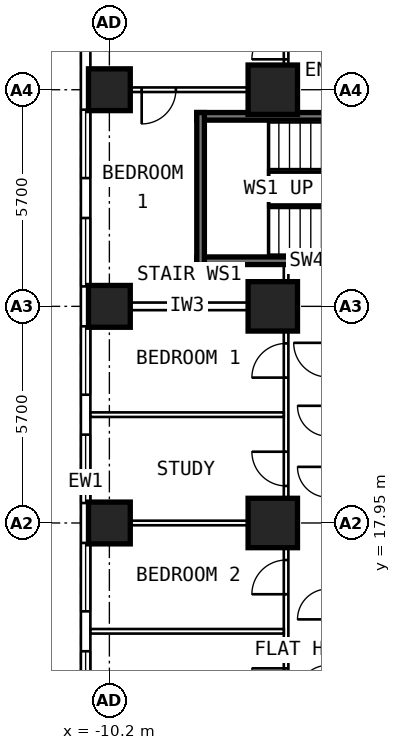
"""IFC4 building model, lengths in metres.
Left out: names, types, materials, properties, quantities, classifications, styles, units other than length and angle.
Written with IfcOpenShell. Run it as: python <this file> out.ifc"""

import sys

from ifc_helpers import new_model, si_unit, direction, frame, frame_2d, origin, origin_2d, place, context, subcontext, project, spatial, rectangle, extrude, element, fill, save


model = new_model("IFC4")
c1 = context("Model", 3, precision=1e-05, world=origin(), true_north=direction((0.0, 1.0)))
c2 = subcontext(c1, "Body", "Model", "MODEL_VIEW")
j1 = project(units=[si_unit("LENGTHUNIT", "METRE"), si_unit("PLANEANGLEUNIT", "RADIAN")], contexts=[c1])
p1 = place(None, origin())
s1 = spatial("IfcSite", under=j1, at=p1, CompositionType="ELEMENT")
p2 = place(p1, origin())
s2 = spatial("IfcBuilding", under=s1, at=p2, CompositionType="ELEMENT")
p3 = place(p2, frame((0.0, 0.0, 43.0)))
s3 = spatial("IfcBuildingStorey", under=s2, at=p3, CompositionType="ELEMENT", Elevation=43.0)
for number, where, z_axis, x_axis in (
    (1, (-10.2, 17.95, 0.0), (0.0, 0.0, 1.0), (0.0, 1.0, 0.0)),
    (2, (-10.2, 23.65, 0.0), (0.0, 0.0, 1.0), (0.0, 1.0, 0.0)),
    (3, (-10.2, 29.35, 0.0), (0.0, 0.0, 1.0), (0.0, 1.0, 0.0)),
):
    element("IfcColumn", number, at=place(p3, frame(where, z_axis=z_axis, x_axis=x_axis)), inside=s3, PredefinedType="COLUMN", context=c2, shape_type="SweptSolid", body=[
        extrude(rectangle(XDim=1.1, YDim=1.1, at=origin_2d()), origin(), (0.0, 0.0, 1.0), 3.6),
    ])
for number, where, z_axis, x_axis in (
    (4, (-5.9, 17.95, 0.0), (0.0, 0.0, 1.0), (0.0, 1.0, 0.0)),
    (5, (-5.9, 23.65, 0.0), (0.0, 0.0, 1.0), (0.0, 1.0, 0.0)),
    (6, (-5.9, 29.35, 0.0), (0.0, 0.0, 1.0), (0.0, 1.0, 0.0)),
):
    element("IfcColumn", number, at=place(p3, frame(where, z_axis=z_axis, x_axis=x_axis)), inside=s3, PredefinedType="COLUMN", context=c2, shape_type="SweptSolid", body=[
        extrude(rectangle(XDim=1.3, YDim=1.3, at=origin_2d()), origin(), (0.0, 0.0, 1.0), 3.6),
    ])
p4 = place(p3, frame((-10.825, 6.409, 0.0), z_axis=(0.0, 0.0, 1.0), x_axis=(0.0, 1.0, 0.0)))
e7 = element("IfcWall", 7, at=p4, inside=s3, PredefinedType="SOLIDWALL", context=c2, shape_type="SweptSolid", body=[
    extrude(rectangle(XDim=25.226, YDim=0.25, at=frame_2d((12.613, 0.0))), origin(), (0.0, 0.0, 1.0), 3.35),
])
p5 = place(p4, frame((0.666, 0.0, 0.8)))
e8 = element("IfcOpeningElement", 8, at=p5, cuts=e7, PredefinedType="OPENING", context=c2, shape_type="SweptSolid", body=[
    extrude(rectangle(XDim=1.8, YDim=1.8, at=frame_2d((0.9, 0.9))), frame((0.0, 0.137, 0.0), z_axis=(0.0, -1.0, 0.0), x_axis=(1.0, 0.0, 0.0)), (0.0, 0.0, 1.0), 0.274),
])
p6 = place(p4, frame((3.516, 0.0, 0.8)))
e9 = element("IfcOpeningElement", 9, at=p6, cuts=e7, PredefinedType="OPENING", context=c2, shape_type="SweptSolid", body=[
    extrude(rectangle(XDim=1.8, YDim=1.8, at=frame_2d((0.9, 0.9))), frame((0.0, 0.137, 0.0), z_axis=(0.0, -1.0, 0.0), x_axis=(1.0, 0.0, 0.0)), (0.0, 0.0, 1.0), 0.274),
])
p7 = place(p4, frame((6.366, 0.0, 0.8)))
e10 = element("IfcOpeningElement", 10, at=p7, cuts=e7, PredefinedType="OPENING", context=c2, shape_type="SweptSolid", body=[
    extrude(rectangle(XDim=1.8, YDim=1.8, at=frame_2d((0.9, 0.9))), frame((0.0, 0.137, 0.0), z_axis=(0.0, -1.0, 0.0), x_axis=(1.0, 0.0, 0.0)), (0.0, 0.0, 1.0), 0.274),
])
p8 = place(p4, frame((9.216, 0.0, 0.8)))
e11 = element("IfcOpeningElement", 11, at=p8, cuts=e7, PredefinedType="OPENING", context=c2, shape_type="SweptSolid", body=[
    extrude(rectangle(XDim=1.8, YDim=1.8, at=frame_2d((0.9, 0.9))), frame((0.0, 0.137, 0.0), z_axis=(0.0, -1.0, 0.0), x_axis=(1.0, 0.0, 0.0)), (0.0, 0.0, 1.0), 0.274),
])
p9 = place(p4, frame((12.066, 0.0, 0.8)))
e12 = element("IfcOpeningElement", 12, at=p9, cuts=e7, PredefinedType="OPENING", context=c2, shape_type="SweptSolid", body=[
    extrude(rectangle(XDim=1.8, YDim=1.8, at=frame_2d((0.9, 0.9))), frame((0.0, 0.137, 0.0), z_axis=(0.0, -1.0, 0.0), x_axis=(1.0, 0.0, 0.0)), (0.0, 0.0, 1.0), 0.274),
])
p10 = place(p4, frame((14.916, 0.0, 0.8)))
e13 = element("IfcOpeningElement", 13, at=p10, cuts=e7, PredefinedType="OPENING", context=c2, shape_type="SweptSolid", body=[
    extrude(rectangle(XDim=1.8, YDim=1.8, at=frame_2d((0.9, 0.9))), frame((0.0, 0.137, 0.0), z_axis=(0.0, -1.0, 0.0), x_axis=(1.0, 0.0, 0.0)), (0.0, 0.0, 1.0), 0.274),
])
p11 = place(p4, frame((17.766, 0.0, 0.8)))
e14 = element("IfcOpeningElement", 14, at=p11, cuts=e7, PredefinedType="OPENING", context=c2, shape_type="SweptSolid", body=[
    extrude(rectangle(XDim=1.8, YDim=1.8, at=frame_2d((0.9, 0.9))), frame((0.0, 0.137, 0.0), z_axis=(0.0, -1.0, 0.0), x_axis=(1.0, 0.0, 0.0)), (0.0, 0.0, 1.0), 0.274),
])
p12 = place(p4, frame((20.616, 0.0, 0.8)))
e15 = element("IfcOpeningElement", 15, at=p12, cuts=e7, PredefinedType="OPENING", context=c2, shape_type="SweptSolid", body=[
    extrude(rectangle(XDim=1.8, YDim=1.8, at=frame_2d((0.9, 0.9))), frame((0.0, 0.137, 0.0), z_axis=(0.0, -1.0, 0.0), x_axis=(1.0, 0.0, 0.0)), (0.0, 0.0, 1.0), 0.274),
])
p13 = place(p3, frame((-5.55, 9.691, 0.0), z_axis=(0.0, 0.0, 1.0), x_axis=(0.0, 1.0, 0.0)))
e16 = element("IfcWall", 16, at=p13, inside=s3, PredefinedType="PARTITIONING", context=c2, shape_type="SweptSolid", body=[
    extrude(rectangle(XDim=15.059, YDim=0.12, at=frame_2d((7.53, 0.0))), origin(), (0.0, 0.0, 1.0), 3.35),
])
p14 = place(p13, frame((0.859, 0.0, 0.0)))
e17 = element("IfcOpeningElement", 17, at=p14, cuts=e16, PredefinedType="OPENING", context=c2, shape_type="SweptSolid", body=[
    extrude(rectangle(XDim=0.9, YDim=2.1, at=frame_2d((0.45, 1.05))), frame((0.0, 0.072, 0.0), z_axis=(0.0, -1.0, 0.0), x_axis=(1.0, 0.0, 0.0)), (0.0, 0.0, 1.0), 0.144),
])
p15 = place(p13, frame((3.534, 0.0, 0.0)))
e18 = element("IfcOpeningElement", 18, at=p15, cuts=e16, PredefinedType="OPENING", context=c2, shape_type="SweptSolid", body=[
    extrude(rectangle(XDim=0.9, YDim=2.1, at=frame_2d((0.45, 1.05))), frame((0.0, 0.072, 0.0), z_axis=(0.0, -1.0, 0.0), x_axis=(1.0, 0.0, 0.0)), (0.0, 0.0, 1.0), 0.144),
])
p16 = place(p13, frame((6.384, 0.0, 0.0)))
e19 = element("IfcOpeningElement", 19, at=p16, cuts=e16, PredefinedType="OPENING", context=c2, shape_type="SweptSolid", body=[
    extrude(rectangle(XDim=0.9, YDim=2.1, at=frame_2d((0.45, 1.05))), frame((0.0, 0.072, 0.0), z_axis=(0.0, -1.0, 0.0), x_axis=(1.0, 0.0, 0.0)), (0.0, 0.0, 1.0), 0.144),
])
p17 = place(p13, frame((9.234, 0.0, 0.0)))
e20 = element("IfcOpeningElement", 20, at=p17, cuts=e16, PredefinedType="OPENING", context=c2, shape_type="SweptSolid", body=[
    extrude(rectangle(XDim=0.9, YDim=2.1, at=frame_2d((0.45, 1.05))), frame((0.0, 0.072, 0.0), z_axis=(0.0, -1.0, 0.0), x_axis=(1.0, 0.0, 0.0)), (0.0, 0.0, 1.0), 0.144),
])
p18 = place(p13, frame((12.084, 0.0, 0.0)))
e21 = element("IfcOpeningElement", 21, at=p18, cuts=e16, PredefinedType="OPENING", context=c2, shape_type="SweptSolid", body=[
    extrude(rectangle(XDim=0.9, YDim=2.1, at=frame_2d((0.45, 1.05))), frame((0.0, 0.072, 0.0), z_axis=(0.0, -1.0, 0.0), x_axis=(1.0, 0.0, 0.0)), (0.0, 0.0, 1.0), 0.144),
])
p19 = place(p3, frame((-5.61, 15.1, 0.0), z_axis=(0.0, 0.0, 1.0), x_axis=(-1.0, 0.0, 0.0)))
e22 = element("IfcWall", 22, at=p19, inside=s3, PredefinedType="PARTITIONING", context=c2, shape_type="SweptSolid", body=[
    extrude(rectangle(XDim=5.09, YDim=0.12, at=frame_2d((2.545, 0.0))), origin(), (0.0, 0.0, 1.0), 3.35),
])
p20 = place(p3, frame((-5.61, 17.95, 0.0), z_axis=(0.0, 0.0, 1.0), x_axis=(-1.0, 0.0, 0.0)))
e23 = element("IfcWall", 23, at=p20, inside=s3, PredefinedType="PARTITIONING", context=c2, shape_type="SweptSolid", body=[
    extrude(rectangle(XDim=5.09, YDim=0.12, at=frame_2d((2.545, 0.0))), origin(), (0.0, 0.0, 1.0), 2.45),
])
p21 = place(p3, frame((-5.61, 20.8, 0.0), z_axis=(0.0, 0.0, 1.0), x_axis=(-1.0, 0.0, 0.0)))
e24 = element("IfcWall", 24, at=p21, inside=s3, PredefinedType="PARTITIONING", context=c2, shape_type="SweptSolid", body=[
    extrude(rectangle(XDim=5.09, YDim=0.12, at=frame_2d((2.545, 0.0))), origin(), (0.0, 0.0, 1.0), 3.35),
])
p22 = place(p3, frame((-5.61, 23.65, 0.0), z_axis=(0.0, 0.0, 1.0), x_axis=(-1.0, 0.0, 0.0)))
e25 = element("IfcWall", 25, at=p22, inside=s3, PredefinedType="PARTITIONING", context=c2, shape_type="SweptSolid", body=[
    extrude(rectangle(XDim=5.09, YDim=0.2, at=frame_2d((2.545, 0.0))), origin(), (0.0, 0.0, 1.0), 2.45),
])
p23 = place(p3, frame((-5.61, 29.35, 0.0), z_axis=(0.0, 0.0, 1.0), x_axis=(-1.0, 0.0, 0.0)))
e26 = element("IfcWall", 26, at=p23, inside=s3, PredefinedType="PARTITIONING", context=c2, shape_type="SweptSolid", body=[
    extrude(rectangle(XDim=5.09, YDim=0.12, at=frame_2d((2.545, 0.0))), origin(), (0.0, 0.0, 1.0), 2.45),
])
p24 = place(p23, frame((2.84, 0.0, 0.0)))
e27 = element("IfcOpeningElement", 27, at=p24, cuts=e26, PredefinedType="OPENING", context=c2, shape_type="SweptSolid", body=[
    extrude(rectangle(XDim=0.9, YDim=2.1, at=frame_2d((0.45, 1.05))), frame((0.0, 0.072, 0.0), z_axis=(0.0, -1.0, 0.0), x_axis=(1.0, 0.0, 0.0)), (0.0, 0.0, 1.0), 0.144),
])
p25 = place(p3, frame((-5.55, 28.95, 0.0), z_axis=(0.0, 0.0, 1.0), x_axis=(0.0, 1.0, 0.0)))
e28 = element("IfcWall", 28, at=p25, inside=s3, PredefinedType="PARTITIONING", context=c2, shape_type="SweptSolid", body=[
    extrude(rectangle(XDim=5.445, YDim=0.12, at=frame_2d((2.723, 0.0))), origin(), (0.0, 0.0, 1.0), 3.35),
])
p26 = place(p25, frame((1.2, 0.0, 0.0)))
e29 = element("IfcOpeningElement", 29, at=p26, cuts=e28, PredefinedType="OPENING", context=c2, shape_type="SweptSolid", body=[
    extrude(rectangle(XDim=0.9, YDim=2.1, at=frame_2d((0.45, 1.05))), frame((0.0, 0.072, 0.0), z_axis=(0.0, -1.0, 0.0), x_axis=(1.0, 0.0, 0.0)), (0.0, 0.0, 1.0), 0.144),
])
for number, where, z_axis, x_axis in (
    (30, (-2.1, 24.85, 0.0), (0.0, 0.0, 1.0), (-1.0, 0.0, 0.0)),
    (31, (-2.1, 28.65, 0.0), (0.0, 0.0, 1.0), (-1.0, 0.0, 0.0)),
):
    element("IfcWall", number, at=place(p3, frame(where, z_axis=z_axis, x_axis=x_axis)), inside=s3, PredefinedType="SHEAR", context=c2, shape_type="SweptSolid", body=[
        extrude(rectangle(XDim=5.8, YDim=0.2, at=frame_2d((2.9, 0.0))), origin(), (0.0, 0.0, 1.0), 3.33),
    ])
p27 = place(p3, frame((-7.8, 24.75, 0.0), z_axis=(0.0, 0.0, 1.0), x_axis=(0.0, 1.0, 0.0)))
e32 = element("IfcWall", 32, at=p27, inside=s3, PredefinedType="SHEAR", context=c2, shape_type="SweptSolid", body=[
    extrude(rectangle(XDim=4.0, YDim=0.2, at=frame_2d((2.0, 0.0))), origin(), (0.0, 0.0, 1.0), 3.33),
])
p28 = place(p7, origin())
e33 = element("IfcWindow", 33, at=p28, inside=s3, PartitioningType="SINGLE_PANEL", PredefinedType="WINDOW", context=c2, shape_type="SweptSolid", body=[
    extrude(rectangle(XDim=1.8, YDim=1.8, at=frame_2d((0.9, 0.9))), frame((0.0, 0.03, 0.0), z_axis=(0.0, -1.0, 0.0), x_axis=(1.0, 0.0, 0.0)), (0.0, 0.0, 1.0), 0.06),
])
fill(e10, e33)
p29 = place(p8, origin())
e34 = element("IfcWindow", 34, at=p29, inside=s3, PartitioningType="SINGLE_PANEL", PredefinedType="WINDOW", context=c2, shape_type="SweptSolid", body=[
    extrude(rectangle(XDim=1.8, YDim=1.8, at=frame_2d((0.9, 0.9))), frame((0.0, 0.03, 0.0), z_axis=(0.0, -1.0, 0.0), x_axis=(1.0, 0.0, 0.0)), (0.0, 0.0, 1.0), 0.06),
])
fill(e11, e34)
p30 = place(p9, origin())
e35 = element("IfcWindow", 35, at=p30, inside=s3, PartitioningType="SINGLE_PANEL", PredefinedType="WINDOW", context=c2, shape_type="SweptSolid", body=[
    extrude(rectangle(XDim=1.8, YDim=1.8, at=frame_2d((0.9, 0.9))), frame((0.0, 0.03, 0.0), z_axis=(0.0, -1.0, 0.0), x_axis=(1.0, 0.0, 0.0)), (0.0, 0.0, 1.0), 0.06),
])
fill(e12, e35)
p31 = place(p10, origin())
e36 = element("IfcWindow", 36, at=p31, inside=s3, PartitioningType="SINGLE_PANEL", PredefinedType="WINDOW", context=c2, shape_type="SweptSolid", body=[
    extrude(rectangle(XDim=1.8, YDim=1.8, at=frame_2d((0.9, 0.9))), frame((0.0, 0.03, 0.0), z_axis=(0.0, -1.0, 0.0), x_axis=(1.0, 0.0, 0.0)), (0.0, 0.0, 1.0), 0.06),
])
fill(e13, e36)
p32 = place(p11, origin())
e37 = element("IfcWindow", 37, at=p32, inside=s3, PartitioningType="SINGLE_PANEL", PredefinedType="WINDOW", context=c2, shape_type="SweptSolid", body=[
    extrude(rectangle(XDim=1.8, YDim=1.8, at=frame_2d((0.9, 0.9))), frame((0.0, 0.03, 0.0), z_axis=(0.0, -1.0, 0.0), x_axis=(1.0, 0.0, 0.0)), (0.0, 0.0, 1.0), 0.06),
])
fill(e14, e37)
p33 = place(p12, origin())
e38 = element("IfcWindow", 38, at=p33, inside=s3, PartitioningType="SINGLE_PANEL", PredefinedType="WINDOW", context=c2, shape_type="SweptSolid", body=[
    extrude(rectangle(XDim=1.8, YDim=1.8, at=frame_2d((0.9, 0.9))), frame((0.0, 0.03, 0.0), z_axis=(0.0, -1.0, 0.0), x_axis=(1.0, 0.0, 0.0)), (0.0, 0.0, 1.0), 0.06),
])
fill(e15, e38)
p34 = place(p15, origin())
e39 = element("IfcDoor", 39, at=p34, inside=s3, OperationType="SINGLE_SWING_RIGHT", PredefinedType="DOOR", context=c2, shape_type="SweptSolid", body=[
    extrude(rectangle(XDim=0.9, YDim=2.1, at=frame_2d((0.45, 1.05))), frame((0.0, 0.025, 0.0), z_axis=(0.0, -1.0, 0.0), x_axis=(1.0, 0.0, 0.0)), (0.0, 0.0, 1.0), 0.05),
])
fill(e18, e39)
p35 = place(p16, origin())
e40 = element("IfcDoor", 40, at=p35, inside=s3, OperationType="SINGLE_SWING_LEFT", PredefinedType="DOOR", context=c2, shape_type="SweptSolid", body=[
    extrude(rectangle(XDim=0.9, YDim=2.1, at=frame_2d((0.45, 1.05))), frame((0.0, 0.025, 0.0), z_axis=(0.0, -1.0, 0.0), x_axis=(1.0, 0.0, 0.0)), (0.0, 0.0, 1.0), 0.05),
])
fill(e19, e40)
p36 = place(p17, origin())
e41 = element("IfcDoor", 41, at=p36, inside=s3, OperationType="SINGLE_SWING_RIGHT", PredefinedType="DOOR", context=c2, shape_type="SweptSolid", body=[
    extrude(rectangle(XDim=0.9, YDim=2.1, at=frame_2d((0.45, 1.05))), frame((0.0, 0.025, 0.0), z_axis=(0.0, -1.0, 0.0), x_axis=(1.0, 0.0, 0.0)), (0.0, 0.0, 1.0), 0.05),
])
fill(e20, e41)
p37 = place(p18, origin())
e42 = element("IfcDoor", 42, at=p37, inside=s3, OperationType="SINGLE_SWING_LEFT", PredefinedType="DOOR", context=c2, shape_type="SweptSolid", body=[
    extrude(rectangle(XDim=0.9, YDim=2.1, at=frame_2d((0.45, 1.05))), frame((0.0, 0.025, 0.0), z_axis=(0.0, -1.0, 0.0), x_axis=(1.0, 0.0, 0.0)), (0.0, 0.0, 1.0), 0.05),
])
fill(e21, e42)
p38 = place(p24, origin())
e43 = element("IfcDoor", 43, at=p38, inside=s3, OperationType="SINGLE_SWING_RIGHT", PredefinedType="DOOR", context=c2, shape_type="SweptSolid", body=[
    extrude(rectangle(XDim=0.9, YDim=2.1, at=frame_2d((0.45, 1.05))), frame((0.0, 0.025, 0.0), z_axis=(0.0, -1.0, 0.0), x_axis=(1.0, 0.0, 0.0)), (0.0, 0.0, 1.0), 0.05),
])
fill(e27, e43)
p39 = place(p26, origin())
e44 = element("IfcDoor", 44, at=p39, inside=s3, OperationType="SINGLE_SWING_LEFT", PredefinedType="DOOR", context=c2, shape_type="SweptSolid", body=[
    extrude(rectangle(XDim=0.9, YDim=2.1, at=frame_2d((0.45, 1.05))), frame((0.0, 0.025, 0.0), z_axis=(0.0, -1.0, 0.0), x_axis=(1.0, 0.0, 0.0)), (0.0, 0.0, 1.0), 0.05),
])
fill(e29, e44)
save(model, sys.argv[1])
